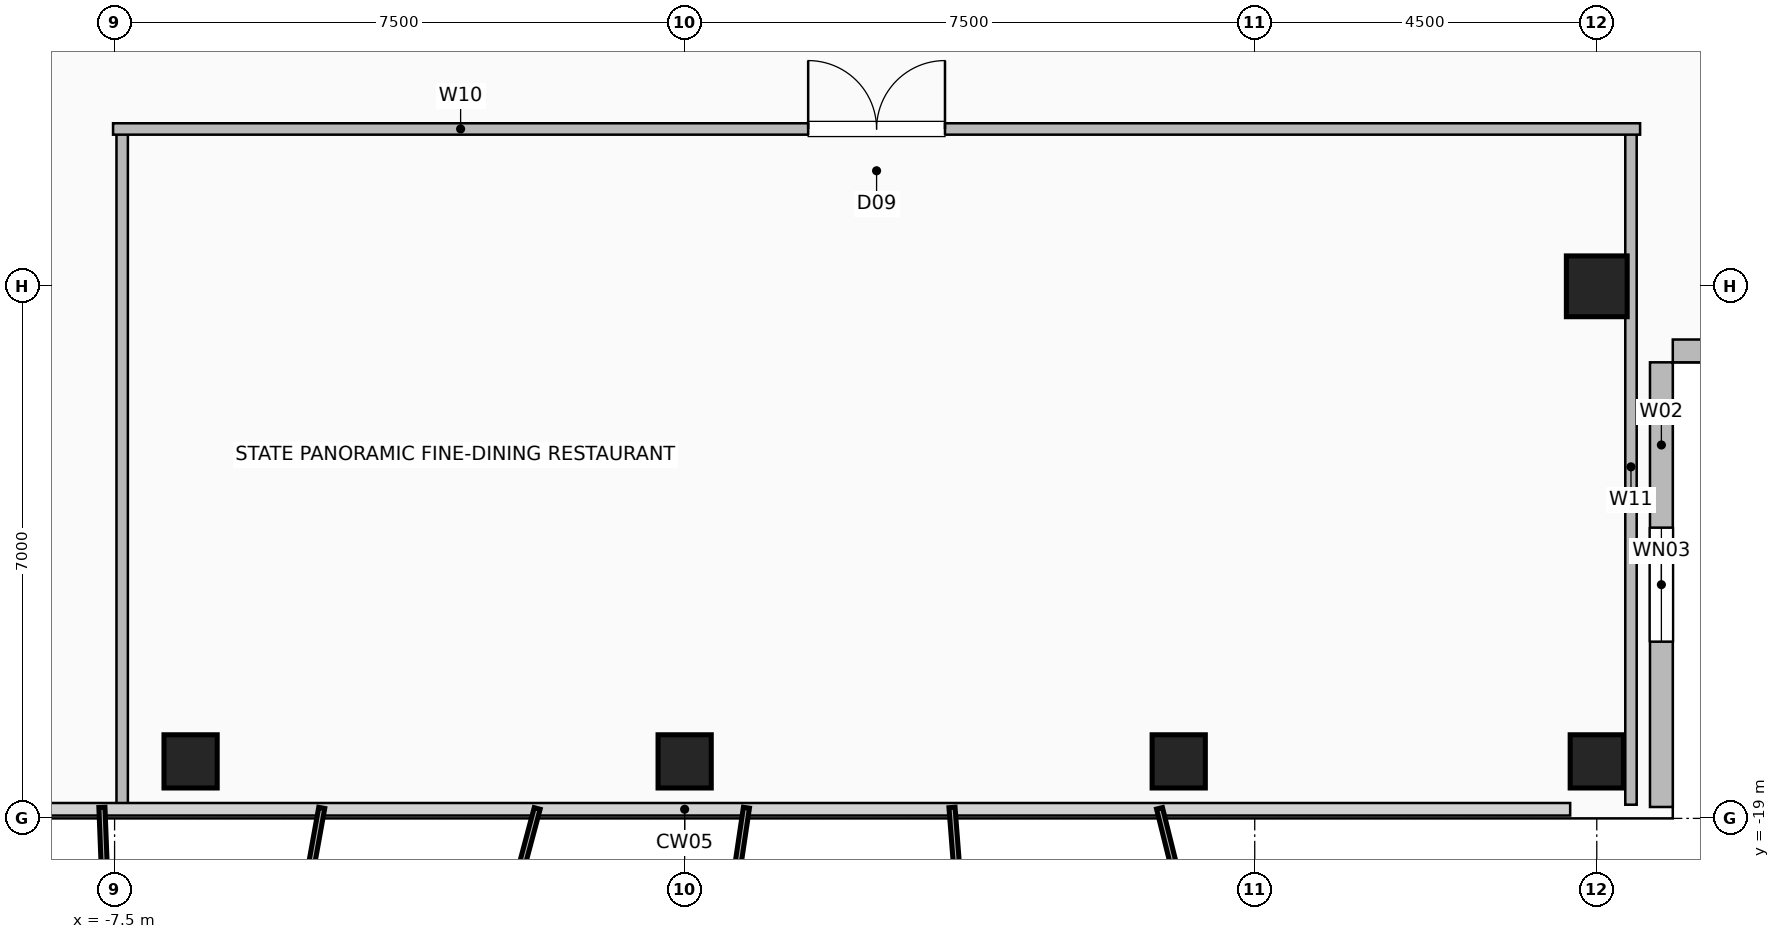
"""IFC4 building model, lengths in metres.
Left out: names, types, materials, properties, quantities, classifications, styles, units other than length and angle.
Written with IfcOpenShell. Run it as: python <this file> out.ifc"""

import sys

from ifc_helpers import new_model, si_unit, direction, frame, frame_2d, origin, origin_2d, place, context, subcontext, project, spatial, rectangle, hollow_rectangle, extrude, element, fill, save


model = new_model("IFC4")
c1 = context("Model", 3, precision=1e-05, world=origin(), true_north=direction((0.0, 1.0)))
c2 = subcontext(c1, "Body", "Model", "MODEL_VIEW")
j1 = project(units=[si_unit("LENGTHUNIT", "METRE"), si_unit("PLANEANGLEUNIT", "RADIAN")], contexts=[c1])
p1 = place(None, origin())
s1 = spatial("IfcSite", under=j1, at=p1, CompositionType="ELEMENT")
p2 = place(p1, origin())
s2 = spatial("IfcBuilding", under=s1, at=p2, CompositionType="ELEMENT")
p3 = place(p2, frame((0.0, 0.0, 261.2)))
s3 = spatial("IfcBuildingStorey", under=s2, at=p3, CompositionType="ELEMENT", Elevation=261.2)
for number, where, z_axis, x_axis in (
    (1, (-6.5, -18.25, 0.0), (0.0, 0.0, 1.0), (1.0, 0.0, 0.0)),
    (2, (0.0, -18.25, 0.0), (0.0, 0.0, 1.0), (1.0, 0.0, 0.0)),
    (3, (6.5, -18.25, 0.0), (0.0, 0.0, 1.0), (1.0, 0.0, 0.0)),
    (4, (12.0, -18.25, 0.0), (0.0, 0.0, 1.0), (1.0, 0.0, 0.0)),
):
    element("IfcColumn", number, at=place(p3, frame(where, z_axis=z_axis, x_axis=x_axis)), inside=s3, PredefinedType="COLUMN", context=c2, shape_type="SweptSolid", body=[
        extrude(hollow_rectangle(XDim=0.7, YDim=0.7, WallThickness=0.035, at=origin_2d()), origin(), (0.0, 0.0, 1.0), 3.6),
    ])
p4 = place(p3, frame((12.0, -12.0, 0.0), z_axis=(0.0, 0.0, 1.0), x_axis=(1.0, 0.0, 0.0)))
e5 = element("IfcColumn", 5, at=p4, inside=s3, PredefinedType="COLUMN", context=c2, shape_type="SweptSolid", body=[
    extrude(hollow_rectangle(XDim=0.8, YDim=0.8, WallThickness=0.04, at=origin_2d()), origin(), (0.0, 0.0, 1.0), 3.6),
])
p5 = place(p3, frame((12.85, -18.85, 0.0), z_axis=(0.0, 0.0, 1.0), x_axis=(0.0, 1.0, 0.0)))
e6 = element("IfcWall", 6, at=p5, inside=s3, PredefinedType="SOLIDWALL", context=c2, shape_type="SweptSolid", body=[
    extrude(rectangle(XDim=5.85, YDim=0.3, at=frame_2d((2.925, 0.0))), origin(), (0.0, 0.0, 1.0), 3.36),
])
p6 = place(p5, frame((2.175, 0.0, 0.9)))
e7 = element("IfcOpeningElement", 7, at=p6, cuts=e6, PredefinedType="OPENING", context=c2, shape_type="SweptSolid", body=[
    extrude(rectangle(XDim=1.5, YDim=1.8, at=frame_2d((0.75, 0.9))), frame((0.0, 0.16, 0.0), z_axis=(0.0, -1.0, 0.0), x_axis=(1.0, 0.0, 0.0)), (0.0, 0.0, 1.0), 0.32),
])
p7 = place(p3, frame((18.85, -12.85, 0.0), z_axis=(0.0, 0.0, 1.0), x_axis=(-1.0, 0.0, 0.0)))
e8 = element("IfcWall", 8, at=p7, inside=s3, PredefinedType="SOLIDWALL", context=c2, shape_type="SweptSolid", body=[
    extrude(rectangle(XDim=5.85, YDim=0.3, at=frame_2d((2.925, 0.0))), origin(), (0.0, 0.0, 1.0), 3.36),
])
for number, where, z_axis, x_axis in (
    (9, (-7.4, -18.82, 0.0), (0.0, 0.0, 1.0), (0.0, 1.0, 0.0)),
    (10, (12.45, -18.82, 0.0), (0.0, 0.0, 1.0), (0.0, 1.0, 0.0)),
):
    element("IfcWall", number, at=place(p3, frame(where, z_axis=z_axis, x_axis=x_axis)), inside=s3, PredefinedType="PARTITIONING", context=c2, shape_type="SweptSolid", body=[
        extrude(rectangle(XDim=8.89, YDim=0.15, at=frame_2d((4.445, 0.0))), origin(), (0.0, 0.0, 1.0), 3.36),
    ])
p8 = place(p3, frame((-7.52, -9.93, 0.0), z_axis=(0.0, 0.0, 1.0), x_axis=(1.0, 0.0, 0.0)))
e11 = element("IfcWall", 11, at=p8, inside=s3, PredefinedType="PARTITIONING", context=c2, shape_type="SweptSolid", body=[
    extrude(rectangle(XDim=20.09, YDim=0.15, at=frame_2d((10.045, 0.0))), origin(), (0.0, 0.0, 1.0), 3.36),
])
p9 = place(p8, frame((9.145, 0.0, 0.0)))
e12 = element("IfcOpeningElement", 12, at=p9, cuts=e11, PredefinedType="OPENING", context=c2, shape_type="SweptSolid", body=[
    extrude(rectangle(XDim=1.8, YDim=2.08, at=frame_2d((0.9, 1.04))), frame((0.0, 0.085, 0.0), z_axis=(0.0, -1.0, 0.0), x_axis=(1.0, 0.0, 0.0)), (0.0, 0.0, 1.0), 0.17),
])
p10 = place(p6, origin())
e13 = element("IfcWindow", 13, at=p10, inside=s3, PartitioningType="SINGLE_PANEL", PredefinedType="WINDOW", context=c2, shape_type="SweptSolid", body=[
    extrude(rectangle(XDim=1.5, YDim=1.8, at=frame_2d((0.75, 0.9))), frame((0.0, 0.03, 0.0), z_axis=(0.0, -1.0, 0.0), x_axis=(1.0, 0.0, 0.0)), (0.0, 0.0, 1.0), 0.06),
])
fill(e7, e13)
p11 = place(p9, origin())
e14 = element("IfcDoor", 14, at=p11, inside=s3, OperationType="DOUBLE_DOOR_SINGLE_SWING", PredefinedType="DOOR", context=c2, shape_type="SweptSolid", body=[
    extrude(rectangle(XDim=1.8, YDim=2.08, at=frame_2d((0.9, 1.04))), frame((0.0, 0.025, 0.0), z_axis=(0.0, -1.0, 0.0), x_axis=(1.0, 0.0, 0.0)), (0.0, 0.0, 1.0), 0.05),
])
fill(e12, e14)
save(model, sys.argv[1])
